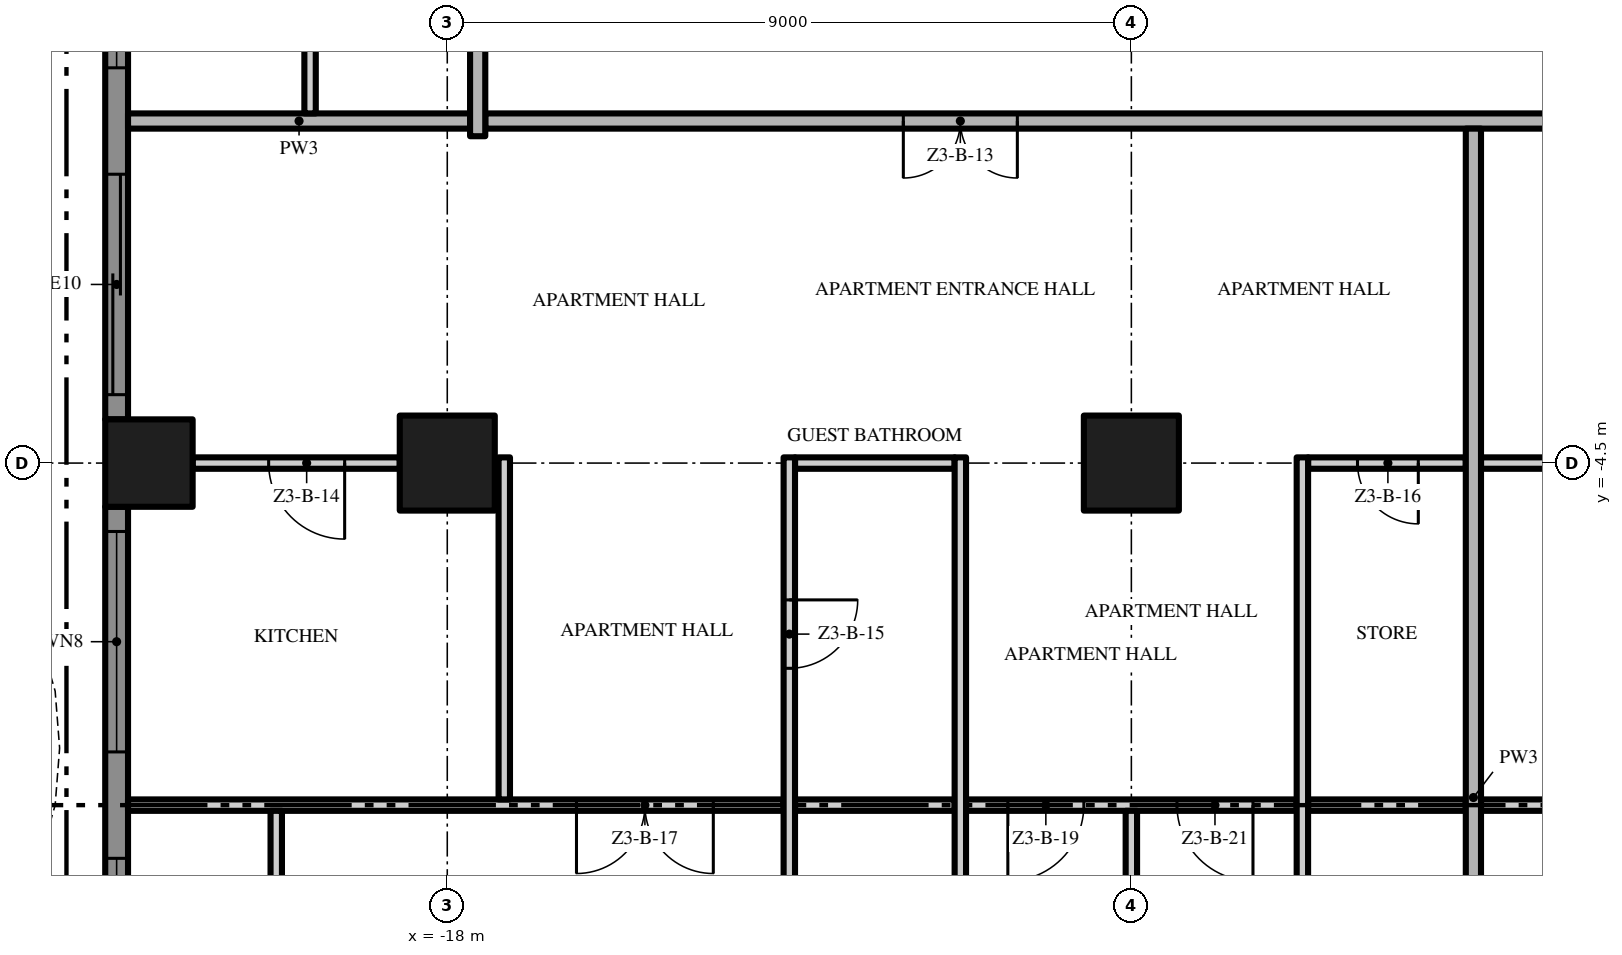
"""IFC4 building model, lengths in metres.
Left out: names, types, materials, properties, quantities, classifications, styles, units other than length and angle.
Written with IfcOpenShell. Run it as: python <this file> out.ifc"""

import sys

from ifc_helpers import new_model, si_unit, direction, frame, frame_2d, origin, origin_2d, place, context, subcontext, project, spatial, polyline, rectangle, outline, extrude, element, fill, save


model = new_model("IFC4")
c1 = context("Model", 3, precision=1e-05, world=origin(), true_north=direction((0.0, 1.0)))
c2 = subcontext(c1, "Body", "Model", "MODEL_VIEW")
j1 = project(units=[si_unit("LENGTHUNIT", "METRE"), si_unit("PLANEANGLEUNIT", "RADIAN")], contexts=[c1])
p1 = place(None, origin())
s1 = spatial("IfcSite", under=j1, at=p1, CompositionType="ELEMENT")
p2 = place(p1, origin())
s2 = spatial("IfcBuilding", under=s1, at=p2, CompositionType="ELEMENT")
p3 = place(p2, frame((0.0, 0.0, 144.0)))
s3 = spatial("IfcBuildingStorey", under=s2, at=p3, CompositionType="ELEMENT", Elevation=144.0)
p4 = place(p3, frame((-18.0, -4.5, 0.0), z_axis=(0.0, 0.0, 1.0), x_axis=(1.0, 0.0, 0.0)))
e1 = element("IfcColumn", 1, at=p4, inside=s3, PredefinedType="COLUMN", context=c2, shape_type="SweptSolid", body=[
    extrude(rectangle(XDim=1.25, YDim=1.25, at=origin_2d()), origin(), (0.0, 0.0, 1.0), 3.5),
])
p5 = place(p3, frame((-21.925, -4.5, 0.0), z_axis=(0.0, 0.0, 1.0), x_axis=(1.0, 0.0, 0.0)))
e2 = element("IfcColumn", 2, at=p5, inside=s3, PredefinedType="COLUMN", context=c2, shape_type="SweptSolid", body=[
    extrude(rectangle(XDim=1.15, YDim=1.15, at=origin_2d()), origin(), (0.0, 0.0, 1.0), 3.5),
])
p6 = place(p3, frame((-9.0, -4.5, 0.0), z_axis=(0.0, 0.0, 1.0), x_axis=(1.0, 0.0, 0.0)))
e3 = element("IfcColumn", 3, at=p6, inside=s3, PredefinedType="COLUMN", context=c2, shape_type="SweptSolid", body=[
    extrude(rectangle(XDim=1.25, YDim=1.25, at=origin_2d()), origin(), (0.0, 0.0, 1.0), 3.5),
])
p7 = place(p3, frame((-22.35, -3.925, 0.0), z_axis=(0.0, 0.0, 1.0), x_axis=(0.0, 1.0, 0.0)))
e4 = element("IfcWall", 4, at=p7, inside=s3, PredefinedType="SOLIDWALL", context=c2, shape_type="SweptSolid", body=[
    extrude(rectangle(XDim=7.85, YDim=0.3, at=frame_2d((3.925, 0.0))), origin(), (0.0, 0.0, 1.0), 3.5),
])
p8 = place(p7, frame((4.625, 0.0, 0.45)))
e5 = element("IfcOpeningElement", 5, at=p8, cuts=e4, PredefinedType="OPENING", context=c2, shape_type="SweptSolid", body=[
    extrude(rectangle(XDim=2.9, YDim=2.65, at=frame_2d((1.45, 1.325))), frame((0.0, 0.16, 0.0), z_axis=(0.0, -1.0, 0.0), x_axis=(1.0, 0.0, 0.0)), (0.0, 0.0, 1.0), 0.32),
])
p9 = place(p7, frame((0.325, 0.0, 0.0)))
e6 = element("IfcOpeningElement", 6, at=p9, cuts=e4, PredefinedType="OPENING", context=c2, shape_type="SweptSolid", body=[
    extrude(rectangle(XDim=2.9, YDim=2.4, at=frame_2d((1.45, 1.2))), frame((0.0, 0.16, 0.0), z_axis=(0.0, -1.0, 0.0), x_axis=(1.0, 0.0, 0.0)), (0.0, 0.0, 1.0), 0.32),
])
p10 = place(p3, frame((-22.35, -12.35, 0.0), z_axis=(0.0, 0.0, 1.0), x_axis=(0.0, 1.0, 0.0)))
e7 = element("IfcWall", 7, at=p10, inside=s3, PredefinedType="SOLIDWALL", context=c2, shape_type="SweptSolid", body=[
    extrude(rectangle(XDim=7.275, YDim=0.3, at=frame_2d((3.638, 0.0))), origin(), (0.0, 0.0, 1.0), 3.5),
])
p11 = place(p10, frame((4.05, 0.0, 0.45)))
e8 = element("IfcOpeningElement", 8, at=p11, cuts=e7, PredefinedType="OPENING", context=c2, shape_type="SweptSolid", body=[
    extrude(rectangle(XDim=2.9, YDim=2.65, at=frame_2d((1.45, 1.325))), frame((0.0, 0.16, 0.0), z_axis=(0.0, -1.0, 0.0), x_axis=(1.0, 0.0, 0.0)), (0.0, 0.0, 1.0), 0.32),
])
p12 = place(p10, frame((0.3, 0.0, 0.45)))
e9 = element("IfcOpeningElement", 9, at=p12, cuts=e7, PredefinedType="OPENING", context=c2, shape_type="SweptSolid", body=[
    extrude(rectangle(XDim=2.35, YDim=2.65, at=frame_2d((1.175, 1.325))), frame((0.0, 0.16, 0.0), z_axis=(0.0, -1.0, 0.0), x_axis=(1.0, 0.0, 0.0)), (0.0, 0.0, 1.0), 0.32),
])
p13 = place(p3, origin())
e10 = element("IfcWall", 10, at=p13, inside=s3, PredefinedType="USERDEFINED", context=c2, shape_type="SweptSolid", body=[
    extrude(outline(polyline([(-24.3, 18.0), (-25.005, 16.5), (-25.441, 15.0), (-25.5, 14.25), (-25.441, 13.5), (-25.005, 12.0), (-24.3, 10.5), (-23.595, 9.0), (-23.159, 7.5), (-23.1, 6.75), (-23.159, 6.0), (-23.595, 4.5), (-24.3, 3.0), (-25.005, 1.5), (-25.441, 0.0), (-25.5, -0.75), (-25.441, -1.5), (-25.005, -3.0), (-24.3, -4.5), (-23.595, -6.0), (-23.159, -7.5), (-23.1, -8.25), (-23.159, -9.0), (-23.595, -10.5), (-24.3, -12.0), (-25.005, -13.5), (-24.779, -13.606), (-24.074, -12.106), (-23.36, -10.589), (-22.911, -9.045), (-22.849, -8.25), (-22.911, -7.455), (-23.36, -5.911), (-24.074, -4.394), (-24.771, -2.911), (-25.194, -1.455), (-25.249, -0.75), (-25.194, -0.045), (-24.771, 1.411), (-24.074, 2.894), (-23.36, 4.411), (-22.911, 5.955), (-22.849, 6.75), (-22.911, 7.545), (-23.36, 9.089), (-24.074, 10.606), (-24.771, 12.089), (-25.194, 13.545), (-25.249, 14.25), (-25.194, 14.955), (-24.771, 16.411), (-24.074, 17.894), (-24.3, 18.0)])), origin(), (0.0, 0.0, 1.0), 0.9),
])
p14 = place(p3, frame((-13.575, -9.0, 0.0), z_axis=(0.0, 0.0, 1.0), x_axis=(-1.0, 0.0, 0.0)))
e11 = element("IfcWall", 11, at=p14, inside=s3, PredefinedType="PARTITIONING", context=c2, shape_type="SweptSolid", body=[
    extrude(rectangle(XDim=8.625, YDim=0.15, at=frame_2d((4.312, 0.0))), origin(), (0.0, 0.0, 1.0), 3.5),
])
p15 = place(p14, frame((0.925, 0.0, 0.0)))
e12 = element("IfcOpeningElement", 12, at=p15, cuts=e11, PredefinedType="OPENING", context=c2, shape_type="SweptSolid", body=[
    extrude(rectangle(XDim=1.8, YDim=2.4, at=frame_2d((0.9, 1.2))), frame((0.0, 0.085, 0.0), z_axis=(0.0, -1.0, 0.0), x_axis=(1.0, 0.0, 0.0)), (0.0, 0.0, 1.0), 0.17),
])
p16 = place(p3, frame((-13.425, -9.0, 0.0), z_axis=(0.0, 0.0, 1.0), x_axis=(1.0, 0.0, 0.0)))
e13 = element("IfcWall", 13, at=p16, inside=s3, PredefinedType="PARTITIONING", context=c2, shape_type="SweptSolid", body=[
    extrude(rectangle(XDim=2.1, YDim=0.15, at=frame_2d((1.05, 0.0))), origin(), (0.0, 0.0, 1.0), 3.5),
])
p17 = place(p3, frame((-6.825, -9.0, 0.0), z_axis=(0.0, 0.0, 1.0), x_axis=(-1.0, 0.0, 0.0)))
e14 = element("IfcWall", 14, at=p17, inside=s3, PredefinedType="PARTITIONING", context=c2, shape_type="SweptSolid", body=[
    extrude(rectangle(XDim=4.35, YDim=0.15, at=frame_2d((2.175, 0.0))), origin(), (0.0, 0.0, 1.0), 3.5),
])
p18 = place(p17, frame((2.8, 0.0, 0.0)))
e15 = element("IfcOpeningElement", 15, at=p18, cuts=e14, PredefinedType="OPENING", context=c2, shape_type="SweptSolid", body=[
    extrude(rectangle(XDim=1.0, YDim=2.4, at=frame_2d((0.5, 1.2))), frame((0.0, 0.085, 0.0), z_axis=(0.0, -1.0, 0.0), x_axis=(1.0, 0.0, 0.0)), (0.0, 0.0, 1.0), 0.17),
])
p19 = place(p17, frame((0.575, 0.0, 0.0)))
e16 = element("IfcOpeningElement", 16, at=p19, cuts=e14, PredefinedType="OPENING", context=c2, shape_type="SweptSolid", body=[
    extrude(rectangle(XDim=1.0, YDim=2.4, at=frame_2d((0.5, 1.2))), frame((0.0, 0.085, 0.0), z_axis=(0.0, -1.0, 0.0), x_axis=(1.0, 0.0, 0.0)), (0.0, 0.0, 1.0), 0.17),
])
for number, where, z_axis, x_axis in (
    (17, (-6.675, -9.0, 0.0), (0.0, 0.0, 1.0), (1.0, 0.0, 0.0)),
    (18, (-4.4, -9.0, 0.0), (0.0, 0.0, 1.0), (1.0, 0.0, 0.0)),
):
    element("IfcWall", number, at=place(p3, frame(where, z_axis=z_axis, x_axis=x_axis)), inside=s3, PredefinedType="PARTITIONING", context=c2, shape_type="SweptSolid", body=[
        extrude(rectangle(XDim=2.075, YDim=0.15, at=frame_2d((1.038, 0.0))), origin(), (0.0, 0.0, 1.0), 3.5),
    ])
p20 = place(p3, frame((-18.625, -4.5, 0.0), z_axis=(0.0, 0.0, 1.0), x_axis=(-1.0, 0.0, 0.0)))
e19 = element("IfcWall", 19, at=p20, inside=s3, PredefinedType="PARTITIONING", context=c2, shape_type="SweptSolid", body=[
    extrude(rectangle(XDim=2.725, YDim=0.15, at=frame_2d((1.363, 0.0))), origin(), (0.0, 0.0, 1.0), 3.5),
])
p21 = place(p20, frame((0.725, 0.0, 0.0)))
e20 = element("IfcOpeningElement", 20, at=p21, cuts=e19, PredefinedType="OPENING", context=c2, shape_type="SweptSolid", body=[
    extrude(rectangle(XDim=1.0, YDim=2.4, at=frame_2d((0.5, 1.2))), frame((0.0, 0.085, 0.0), z_axis=(0.0, -1.0, 0.0), x_axis=(1.0, 0.0, 0.0)), (0.0, 0.0, 1.0), 0.17),
])
p22 = place(p3, frame((-13.425, -4.5, 0.0), z_axis=(0.0, 0.0, 1.0), x_axis=(1.0, 0.0, 0.0)))
e21 = element("IfcWall", 21, at=p22, inside=s3, PredefinedType="PARTITIONING", context=c2, shape_type="SweptSolid", body=[
    extrude(rectangle(XDim=2.1, YDim=0.15, at=frame_2d((1.05, 0.0))), origin(), (0.0, 0.0, 1.0), 3.5),
])
p23 = place(p3, frame((-4.6, -4.5, 0.0), z_axis=(0.0, 0.0, 1.0), x_axis=(-1.0, 0.0, 0.0)))
e22 = element("IfcWall", 22, at=p23, inside=s3, PredefinedType="PARTITIONING", context=c2, shape_type="SweptSolid", body=[
    extrude(rectangle(XDim=2.075, YDim=0.15, at=frame_2d((1.038, 0.0))), origin(), (0.0, 0.0, 1.0), 3.5),
])
p24 = place(p23, frame((0.625, 0.0, 0.0)))
e23 = element("IfcOpeningElement", 23, at=p24, cuts=e22, PredefinedType="OPENING", context=c2, shape_type="SweptSolid", body=[
    extrude(rectangle(XDim=0.8, YDim=2.0, at=frame_2d((0.4, 1.0))), frame((0.0, 0.085, 0.0), z_axis=(0.0, -1.0, 0.0), x_axis=(1.0, 0.0, 0.0)), (0.0, 0.0, 1.0), 0.17),
])
p25 = place(p3, frame((-4.4, -4.5, 0.0), z_axis=(0.0, 0.0, 1.0), x_axis=(1.0, 0.0, 0.0)))
e24 = element("IfcWall", 24, at=p25, inside=s3, PredefinedType="PARTITIONING", context=c2, shape_type="SweptSolid", body=[
    extrude(rectangle(XDim=2.075, YDim=0.15, at=frame_2d((1.038, 0.0))), origin(), (0.0, 0.0, 1.0), 3.5),
])
p26 = place(p3, frame((17.5, 0.0, 0.0), z_axis=(0.0, 0.0, 1.0), x_axis=(-1.0, 0.0, 0.0)))
e25 = element("IfcWall", 25, at=p26, inside=s3, PredefinedType="PARTITIONING", context=c2, shape_type="SweptSolid", body=[
    extrude(rectangle(XDim=35.0, YDim=0.2, at=frame_2d((17.5, 0.0))), origin(), (0.0, 0.0, 1.0), 3.5),
])
p27 = place(p26, frame((28.0, 0.0, 0.0)))
e26 = element("IfcOpeningElement", 26, at=p27, cuts=e25, PredefinedType="OPENING", context=c2, shape_type="SweptSolid", body=[
    extrude(rectangle(XDim=1.5, YDim=2.4, at=frame_2d((0.75, 1.2))), frame((0.0, 0.11, 0.0), z_axis=(0.0, -1.0, 0.0), x_axis=(1.0, 0.0, 0.0)), (0.0, 0.0, 1.0), 0.22),
])
p28 = place(p26, frame((10.0, 0.0, 0.0)))
e27 = element("IfcOpeningElement", 27, at=p28, cuts=e25, PredefinedType="OPENING", context=c2, shape_type="SweptSolid", body=[
    extrude(rectangle(XDim=1.5, YDim=2.4, at=frame_2d((0.75, 1.2))), frame((0.0, 0.11, 0.0), z_axis=(0.0, -1.0, 0.0), x_axis=(1.0, 0.0, 0.0)), (0.0, 0.0, 1.0), 0.22),
])
p29 = place(p3, frame((-22.2, 0.0, 0.0), z_axis=(0.0, 0.0, 1.0), x_axis=(1.0, 0.0, 0.0)))
e28 = element("IfcWall", 28, at=p29, inside=s3, PredefinedType="PARTITIONING", context=c2, shape_type="SweptSolid", body=[
    extrude(rectangle(XDim=4.5, YDim=0.2, at=frame_2d((2.25, 0.0))), origin(), (0.0, 0.0, 1.0), 3.5),
])
p30 = place(p3, frame((-20.25, -12.075, 0.0), z_axis=(0.0, 0.0, 1.0), x_axis=(0.0, 1.0, 0.0)))
e29 = element("IfcWall", 29, at=p30, inside=s3, PredefinedType="PARTITIONING", context=c2, shape_type="SweptSolid", body=[
    extrude(rectangle(XDim=3.0, YDim=0.15, at=frame_2d((1.5, 0.0))), origin(), (0.0, 0.0, 1.0), 3.5),
])
p31 = place(p30, frame((1.125, 0.0, 0.0)))
e30 = element("IfcOpeningElement", 30, at=p31, cuts=e29, PredefinedType="OPENING", context=c2, shape_type="SweptSolid", body=[
    extrude(rectangle(XDim=0.9, YDim=2.1, at=frame_2d((0.45, 1.05))), frame((0.0, 0.085, 0.0), z_axis=(0.0, -1.0, 0.0), x_axis=(1.0, 0.0, 0.0)), (0.0, 0.0, 1.0), 0.17),
])
p32 = place(p3, frame((-19.805, 0.1, 0.0), z_axis=(0.0, 0.0, 1.0), x_axis=(0.0, 1.0, 0.0)))
e31 = element("IfcWall", 31, at=p32, inside=s3, PredefinedType="PARTITIONING", context=c2, shape_type="SweptSolid", body=[
    extrude(rectangle(XDim=2.225, YDim=0.15, at=frame_2d((1.113, 0.0))), origin(), (0.0, 0.0, 1.0), 3.5),
])
p33 = place(p3, frame((-17.6, -0.2, 0.0), z_axis=(0.0, 0.0, 1.0), x_axis=(0.0, 1.0, 0.0)))
e32 = element("IfcWall", 32, at=p33, inside=s3, PredefinedType="PARTITIONING", context=c2, shape_type="SweptSolid", body=[
    extrude(rectangle(XDim=4.075, YDim=0.2, at=frame_2d((2.038, 0.0))), origin(), (0.0, 0.0, 1.0), 3.5),
])
p34 = place(p3, frame((-17.25, -8.925, 0.0), z_axis=(0.0, 0.0, 1.0), x_axis=(0.0, 1.0, 0.0)))
e33 = element("IfcWall", 33, at=p34, inside=s3, PredefinedType="PARTITIONING", context=c2, shape_type="SweptSolid", body=[
    extrude(rectangle(XDim=4.5, YDim=0.15, at=frame_2d((2.25, 0.0))), origin(), (0.0, 0.0, 1.0), 3.5),
])
p35 = place(p3, frame((-13.5, -4.425, 0.0), z_axis=(0.0, 0.0, 1.0), x_axis=(0.0, -1.0, 0.0)))
e34 = element("IfcWall", 34, at=p35, inside=s3, PredefinedType="PARTITIONING", context=c2, shape_type="SweptSolid", body=[
    extrude(rectangle(XDim=13.275, YDim=0.15, at=frame_2d((6.638, 0.0))), origin(), (0.0, 0.0, 1.0), 3.5),
])
p36 = place(p35, frame((1.875, 0.0, 0.0)))
e35 = element("IfcOpeningElement", 35, at=p36, cuts=e34, PredefinedType="OPENING", context=c2, shape_type="SweptSolid", body=[
    extrude(rectangle(XDim=0.9, YDim=2.1, at=frame_2d((0.45, 1.05))), frame((0.0, 0.085, 0.0), z_axis=(0.0, -1.0, 0.0), x_axis=(1.0, 0.0, 0.0)), (0.0, 0.0, 1.0), 0.17),
])
p37 = place(p3, frame((-11.25, -12.075, 0.0), z_axis=(0.0, 0.0, 1.0), x_axis=(0.0, 1.0, 0.0)))
e36 = element("IfcWall", 36, at=p37, inside=s3, PredefinedType="PARTITIONING", context=c2, shape_type="SweptSolid", body=[
    extrude(rectangle(XDim=7.65, YDim=0.15, at=frame_2d((3.825, 0.0))), origin(), (0.0, 0.0, 1.0), 3.5),
])
p38 = place(p3, frame((-9.0, -12.875, 0.0), z_axis=(0.0, 0.0, 1.0), x_axis=(0.0, 1.0, 0.0)))
e37 = element("IfcWall", 37, at=p38, inside=s3, PredefinedType="PARTITIONING", context=c2, shape_type="SweptSolid", body=[
    extrude(rectangle(XDim=3.8, YDim=0.15, at=frame_2d((1.9, 0.0))), origin(), (0.0, 0.0, 1.0), 3.5),
])
p39 = place(p3, frame((-6.75, -12.075, 0.0), z_axis=(0.0, 0.0, 1.0), x_axis=(0.0, 1.0, 0.0)))
e38 = element("IfcWall", 38, at=p39, inside=s3, PredefinedType="PARTITIONING", context=c2, shape_type="SweptSolid", body=[
    extrude(rectangle(XDim=7.65, YDim=0.15, at=frame_2d((3.825, 0.0))), origin(), (0.0, 0.0, 1.0), 3.5),
])
p40 = place(p3, frame((-4.5, -17.7, 0.0), z_axis=(0.0, 0.0, 1.0), x_axis=(0.0, 1.0, 0.0)))
e39 = element("IfcWall", 39, at=p40, inside=s3, PredefinedType="PARTITIONING", context=c2, shape_type="SweptSolid", body=[
    extrude(rectangle(XDim=17.6, YDim=0.2, at=frame_2d((8.8, 0.0))), origin(), (0.0, 0.0, 1.0), 3.5),
])
p41 = place(p8, origin())
e40 = element("IfcWindow", 40, at=p41, inside=s3, PartitioningType="SINGLE_PANEL", PredefinedType="WINDOW", context=c2, shape_type="SweptSolid", body=[
    extrude(rectangle(XDim=2.9, YDim=2.65, at=frame_2d((1.45, 1.325))), frame((0.0, 0.03, 0.0), z_axis=(0.0, -1.0, 0.0), x_axis=(1.0, 0.0, 0.0)), (0.0, 0.0, 1.0), 0.06),
])
fill(e5, e40)
p42 = place(p9, origin())
e41 = element("IfcDoor", 41, at=p42, inside=s3, OperationType="SINGLE_SWING_LEFT", PredefinedType="DOOR", context=c2, shape_type="SweptSolid", body=[
    extrude(rectangle(XDim=2.9, YDim=2.4, at=frame_2d((1.45, 1.2))), frame((0.0, 0.025, 0.0), z_axis=(0.0, -1.0, 0.0), x_axis=(1.0, 0.0, 0.0)), (0.0, 0.0, 1.0), 0.05),
])
fill(e6, e41)
p43 = place(p11, origin())
e42 = element("IfcWindow", 42, at=p43, inside=s3, PartitioningType="SINGLE_PANEL", PredefinedType="WINDOW", context=c2, shape_type="SweptSolid", body=[
    extrude(rectangle(XDim=2.9, YDim=2.65, at=frame_2d((1.45, 1.325))), frame((0.0, 0.03, 0.0), z_axis=(0.0, -1.0, 0.0), x_axis=(1.0, 0.0, 0.0)), (0.0, 0.0, 1.0), 0.06),
])
fill(e8, e42)
p44 = place(p12, origin())
e43 = element("IfcWindow", 43, at=p44, inside=s3, PartitioningType="SINGLE_PANEL", PredefinedType="WINDOW", context=c2, shape_type="SweptSolid", body=[
    extrude(rectangle(XDim=2.35, YDim=2.65, at=frame_2d((1.175, 1.325))), frame((0.0, 0.03, 0.0), z_axis=(0.0, -1.0, 0.0), x_axis=(1.0, 0.0, 0.0)), (0.0, 0.0, 1.0), 0.06),
])
fill(e9, e43)
p45 = place(p27, origin())
e44 = element("IfcDoor", 44, at=p45, inside=s3, OperationType="DOUBLE_DOOR_SINGLE_SWING", PredefinedType="DOOR", context=c2, shape_type="SweptSolid", body=[
    extrude(rectangle(XDim=1.5, YDim=2.4, at=frame_2d((0.75, 1.2))), frame((0.0, 0.025, 0.0), z_axis=(0.0, -1.0, 0.0), x_axis=(1.0, 0.0, 0.0)), (0.0, 0.0, 1.0), 0.05),
])
fill(e26, e44)
p46 = place(p21, origin())
e45 = element("IfcDoor", 45, at=p46, inside=s3, OperationType="SINGLE_SWING_LEFT", PredefinedType="DOOR", context=c2, shape_type="SweptSolid", body=[
    extrude(rectangle(XDim=1.0, YDim=2.4, at=frame_2d((0.5, 1.2))), frame((0.0, 0.025, 0.0), z_axis=(0.0, -1.0, 0.0), x_axis=(1.0, 0.0, 0.0)), (0.0, 0.0, 1.0), 0.05),
])
fill(e20, e45)
p47 = place(p36, origin())
e46 = element("IfcDoor", 46, at=p47, inside=s3, OperationType="SINGLE_SWING_LEFT", PredefinedType="DOOR", context=c2, shape_type="SweptSolid", body=[
    extrude(rectangle(XDim=0.9, YDim=2.1, at=frame_2d((0.45, 1.05))), frame((0.0, 0.025, 0.0), z_axis=(0.0, -1.0, 0.0), x_axis=(1.0, 0.0, 0.0)), (0.0, 0.0, 1.0), 0.05),
])
fill(e35, e46)
p48 = place(p24, origin())
e47 = element("IfcDoor", 47, at=p48, inside=s3, OperationType="SINGLE_SWING_LEFT", PredefinedType="DOOR", context=c2, shape_type="SweptSolid", body=[
    extrude(rectangle(XDim=0.8, YDim=2.0, at=frame_2d((0.4, 1.0))), frame((0.0, 0.025, 0.0), z_axis=(0.0, -1.0, 0.0), x_axis=(1.0, 0.0, 0.0)), (0.0, 0.0, 1.0), 0.05),
])
fill(e23, e47)
p49 = place(p15, origin())
e48 = element("IfcDoor", 48, at=p49, inside=s3, OperationType="DOUBLE_DOOR_SINGLE_SWING", PredefinedType="DOOR", context=c2, shape_type="SweptSolid", body=[
    extrude(rectangle(XDim=1.8, YDim=2.4, at=frame_2d((0.9, 1.2))), frame((0.0, 0.025, 0.0), z_axis=(0.0, -1.0, 0.0), x_axis=(1.0, 0.0, 0.0)), (0.0, 0.0, 1.0), 0.05),
])
fill(e12, e48)
p50 = place(p18, origin())
e49 = element("IfcDoor", 49, at=p50, inside=s3, OperationType="SINGLE_SWING_RIGHT", PredefinedType="DOOR", context=c2, shape_type="SweptSolid", body=[
    extrude(rectangle(XDim=1.0, YDim=2.4, at=frame_2d((0.5, 1.2))), frame((0.0, 0.025, 0.0), z_axis=(0.0, -1.0, 0.0), x_axis=(1.0, 0.0, 0.0)), (0.0, 0.0, 1.0), 0.05),
])
fill(e15, e49)
p51 = place(p19, origin())
e50 = element("IfcDoor", 50, at=p51, inside=s3, OperationType="SINGLE_SWING_LEFT", PredefinedType="DOOR", context=c2, shape_type="SweptSolid", body=[
    extrude(rectangle(XDim=1.0, YDim=2.4, at=frame_2d((0.5, 1.2))), frame((0.0, 0.025, 0.0), z_axis=(0.0, -1.0, 0.0), x_axis=(1.0, 0.0, 0.0)), (0.0, 0.0, 1.0), 0.05),
])
fill(e16, e50)
save(model, sys.argv[1])
